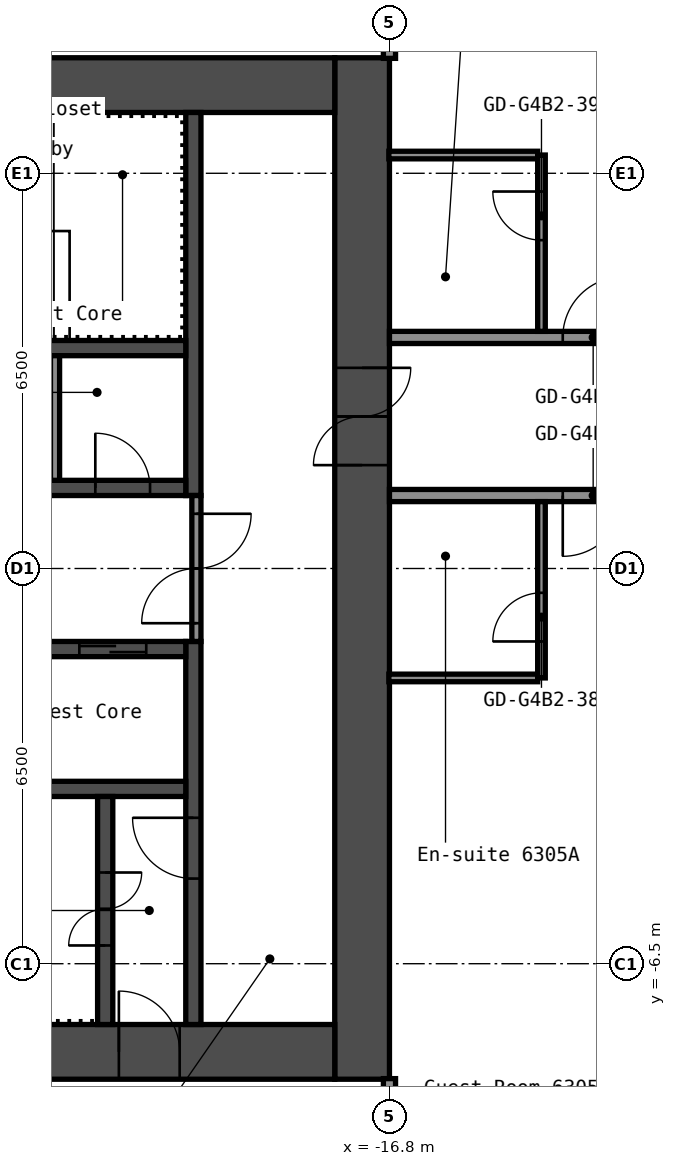
"""IFC4 building model, lengths in metres.
Left out: names, types, materials, properties, quantities, classifications, styles, units other than length and angle.
Written with IfcOpenShell. Run it as: python <this file> out.ifc"""

import sys

from ifc_helpers import new_model, si_unit, direction, frame, frame_2d, origin, place, context, subcontext, project, spatial, rectangle, extrude, element, fill, save


model = new_model("IFC4")
c1 = context("Model", 3, precision=1e-05, world=origin(), true_north=direction((0.0, 1.0)))
c2 = subcontext(c1, "Body", "Model", "MODEL_VIEW")
j1 = project(units=[si_unit("LENGTHUNIT", "METRE"), si_unit("PLANEANGLEUNIT", "RADIAN")], contexts=[c1])
p1 = place(None, origin())
s1 = spatial("IfcSite", under=j1, at=p1, CompositionType="ELEMENT")
p2 = place(p1, origin())
s2 = spatial("IfcBuilding", under=s1, at=p2, CompositionType="ELEMENT")
p3 = place(p2, frame((0.0, 0.0, 221.8)))
s3 = spatial("IfcBuildingStorey", under=s2, at=p3, CompositionType="ELEMENT", Elevation=221.8)
p4 = place(p3, frame((-17.25, -8.4, 0.0), z_axis=(0.0, 0.0, 1.0), x_axis=(0.0, 1.0, 0.0)))
e1 = element("IfcWall", 1, at=p4, inside=s3, PredefinedType="SHEAR", context=c2, shape_type="SweptSolid", body=[
    extrude(rectangle(XDim=16.8, YDim=0.9, at=frame_2d((8.4, 0.0))), origin(), (0.0, 0.0, 1.0), 2.75),
])
p5 = place(p4, frame((10.1, 0.0, 0.0)))
e2 = element("IfcOpeningElement", 2, at=p5, cuts=e1, PredefinedType="OPENING", context=c2, shape_type="SweptSolid", body=[
    extrude(rectangle(XDim=1.6, YDim=2.1, at=frame_2d((0.8, 1.05))), frame((0.0, 0.46, 0.0), z_axis=(0.0, -1.0, 0.0), x_axis=(1.0, 0.0, 0.0)), (0.0, 0.0, 1.0), 0.92),
])
p6 = place(p3, frame((-32.7, 7.95, 0.0), z_axis=(0.0, 0.0, 1.0), x_axis=(1.0, 0.0, 0.0)))
e3 = element("IfcWall", 3, at=p6, inside=s3, PredefinedType="SHEAR", context=c2, shape_type="SweptSolid", body=[
    extrude(rectangle(XDim=15.0, YDim=0.9, at=frame_2d((7.5, 0.0))), origin(), (0.0, 0.0, 1.0), 2.75),
])
p7 = place(p6, frame((3.4, 0.0, 0.0)))
e4 = element("IfcOpeningElement", 4, at=p7, cuts=e3, PredefinedType="OPENING", context=c2, shape_type="SweptSolid", body=[
    extrude(rectangle(XDim=1.2, YDim=2.1, at=frame_2d((0.6, 1.05))), frame((0.0, 0.46, 0.0), z_axis=(0.0, -1.0, 0.0), x_axis=(1.0, 0.0, 0.0)), (0.0, 0.0, 1.0), 0.92),
])
p8 = place(p6, frame((0.75, 0.0, 0.0)))
e5 = element("IfcOpeningElement", 5, at=p8, cuts=e3, PredefinedType="OPENING", context=c2, shape_type="SweptSolid", body=[
    extrude(rectangle(XDim=0.9, YDim=2.1, at=frame_2d((0.45, 1.05))), frame((0.0, 0.46, 0.0), z_axis=(0.0, -1.0, 0.0), x_axis=(1.0, 0.0, 0.0)), (0.0, 0.0, 1.0), 0.92),
])
p9 = place(p3, frame((-32.7, -7.95, 0.0), z_axis=(0.0, 0.0, 1.0), x_axis=(1.0, 0.0, 0.0)))
e6 = element("IfcWall", 6, at=p9, inside=s3, PredefinedType="SHEAR", context=c2, shape_type="SweptSolid", body=[
    extrude(rectangle(XDim=15.0, YDim=0.9, at=frame_2d((7.5, 0.0))), origin(), (0.0, 0.0, 1.0), 2.75),
])
p10 = place(p9, frame((11.45, 0.0, 0.0)))
e7 = element("IfcOpeningElement", 7, at=p10, cuts=e6, PredefinedType="OPENING", context=c2, shape_type="SweptSolid", body=[
    extrude(rectangle(XDim=1.0, YDim=2.1, at=frame_2d((0.5, 1.05))), frame((0.0, 0.46, 0.0), z_axis=(0.0, -1.0, 0.0), x_axis=(1.0, 0.0, 0.0)), (0.0, 0.0, 1.0), 0.92),
])
p11 = place(p3, frame((-20.025, 1.2, 0.0), z_axis=(0.0, 0.0, 1.0), x_axis=(0.0, 1.0, 0.0)))
e8 = element("IfcWall", 8, at=p11, inside=s3, PredefinedType="SHEAR", context=c2, shape_type="SweptSolid", body=[
    extrude(rectangle(XDim=6.3, YDim=0.25, at=frame_2d((3.15, 0.0))), origin(), (0.0, 0.0, 1.0), 2.75),
])
p12 = place(p3, frame((-20.025, -7.5, 0.0), z_axis=(0.0, 0.0, 1.0), x_axis=(0.0, 1.0, 0.0)))
e9 = element("IfcWall", 9, at=p12, inside=s3, PredefinedType="SHEAR", context=c2, shape_type="SweptSolid", body=[
    extrude(rectangle(XDim=6.3, YDim=0.25, at=frame_2d((3.15, 0.0))), origin(), (0.0, 0.0, 1.0), 2.75),
])
p13 = place(p12, frame((2.4, 0.0, 0.0)))
e10 = element("IfcOpeningElement", 10, at=p13, cuts=e9, PredefinedType="OPENING", context=c2, shape_type="SweptSolid", body=[
    extrude(rectangle(XDim=1.0, YDim=2.1, at=frame_2d((0.5, 1.05))), frame((0.0, 0.135, 0.0), z_axis=(0.0, -1.0, 0.0), x_axis=(1.0, 0.0, 0.0)), (0.0, 0.0, 1.0), 0.27),
])
p14 = place(p3, frame((-27.65, 1.325, 0.0), z_axis=(0.0, 0.0, 1.0), x_axis=(1.0, 0.0, 0.0)))
e11 = element("IfcWall", 11, at=p14, inside=s3, PredefinedType="SHEAR", context=c2, shape_type="SweptSolid", body=[
    extrude(rectangle(XDim=7.5, YDim=0.25, at=frame_2d((3.75, 0.0))), origin(), (0.0, 0.0, 1.0), 2.75),
])
p15 = place(p14, frame((6.012, 0.0, 0.0)))
e12 = element("IfcOpeningElement", 12, at=p15, cuts=e11, PredefinedType="OPENING", context=c2, shape_type="SweptSolid", body=[
    extrude(rectangle(XDim=0.9, YDim=2.1, at=frame_2d((0.45, 1.05))), frame((0.0, 0.135, 0.0), z_axis=(0.0, -1.0, 0.0), x_axis=(1.0, 0.0, 0.0)), (0.0, 0.0, 1.0), 0.27),
])
p16 = place(p14, frame((2.312, 0.0, 0.0)))
e13 = element("IfcOpeningElement", 13, at=p16, cuts=e11, PredefinedType="OPENING", context=c2, shape_type="SweptSolid", body=[
    extrude(rectangle(XDim=0.9, YDim=2.1, at=frame_2d((0.45, 1.05))), frame((0.0, 0.135, 0.0), z_axis=(0.0, -1.0, 0.0), x_axis=(1.0, 0.0, 0.0)), (0.0, 0.0, 1.0), 0.27),
])
p17 = place(p3, frame((-27.65, 3.625, 0.0), z_axis=(0.0, 0.0, 1.0), x_axis=(1.0, 0.0, 0.0)))
e14 = element("IfcWall", 14, at=p17, inside=s3, PredefinedType="SHEAR", context=c2, shape_type="SweptSolid", body=[
    extrude(rectangle(XDim=7.5, YDim=0.25, at=frame_2d((3.75, 0.0))), origin(), (0.0, 0.0, 1.0), 2.75),
])
p18 = place(p3, frame((-27.65, -1.325, 0.0), z_axis=(0.0, 0.0, 1.0), x_axis=(1.0, 0.0, 0.0)))
e15 = element("IfcWall", 15, at=p18, inside=s3, PredefinedType="SHEAR", context=c2, shape_type="SweptSolid", body=[
    extrude(rectangle(XDim=7.5, YDim=0.25, at=frame_2d((3.75, 0.0))), origin(), (0.0, 0.0, 1.0), 2.75),
])
p19 = place(p18, frame((5.75, 0.0, 0.0)))
e16 = element("IfcOpeningElement", 16, at=p19, cuts=e15, PredefinedType="OPENING", context=c2, shape_type="SweptSolid", body=[
    extrude(rectangle(XDim=1.1, YDim=2.1, at=frame_2d((0.55, 1.05))), frame((0.0, 0.135, 0.0), z_axis=(0.0, -1.0, 0.0), x_axis=(1.0, 0.0, 0.0)), (0.0, 0.0, 1.0), 0.27),
])
p20 = place(p18, frame((3.35, 0.0, 0.0)))
e17 = element("IfcOpeningElement", 17, at=p20, cuts=e15, PredefinedType="OPENING", context=c2, shape_type="SweptSolid", body=[
    extrude(rectangle(XDim=1.1, YDim=2.1, at=frame_2d((0.55, 1.05))), frame((0.0, 0.135, 0.0), z_axis=(0.0, -1.0, 0.0), x_axis=(1.0, 0.0, 0.0)), (0.0, 0.0, 1.0), 0.27),
])
p21 = place(p18, frame((0.95, 0.0, 0.0)))
e18 = element("IfcOpeningElement", 18, at=p21, cuts=e15, PredefinedType="OPENING", context=c2, shape_type="SweptSolid", body=[
    extrude(rectangle(XDim=1.1, YDim=2.1, at=frame_2d((0.55, 1.05))), frame((0.0, 0.135, 0.0), z_axis=(0.0, -1.0, 0.0), x_axis=(1.0, 0.0, 0.0)), (0.0, 0.0, 1.0), 0.27),
])
p22 = place(p3, frame((-27.65, -3.625, 0.0), z_axis=(0.0, 0.0, 1.0), x_axis=(1.0, 0.0, 0.0)))
e19 = element("IfcWall", 19, at=p22, inside=s3, PredefinedType="SHEAR", context=c2, shape_type="SweptSolid", body=[
    extrude(rectangle(XDim=7.5, YDim=0.25, at=frame_2d((3.75, 0.0))), origin(), (0.0, 0.0, 1.0), 2.75),
])
p23 = place(p3, frame((-21.475, -7.5, 0.0), z_axis=(0.0, 0.0, 1.0), x_axis=(0.0, 1.0, 0.0)))
e20 = element("IfcWall", 20, at=p23, inside=s3, PredefinedType="SHEAR", context=c2, shape_type="SweptSolid", body=[
    extrude(rectangle(XDim=3.75, YDim=0.25, at=frame_2d((1.875, 0.0))), origin(), (0.0, 0.0, 1.0), 2.75),
])
p24 = place(p23, frame((1.3, 0.0, 0.0)))
e21 = element("IfcOpeningElement", 21, at=p24, cuts=e20, PredefinedType="OPENING", context=c2, shape_type="SweptSolid", body=[
    extrude(rectangle(XDim=1.2, YDim=2.1, at=frame_2d((0.6, 1.05))), frame((0.0, 0.135, 0.0), z_axis=(0.0, -1.0, 0.0), x_axis=(1.0, 0.0, 0.0)), (0.0, 0.0, 1.0), 0.27),
])
p25 = place(p3, frame((-19.975, -1.2, 0.0), z_axis=(0.0, 0.0, 1.0), x_axis=(0.0, 1.0, 0.0)))
e22 = element("IfcWall", 22, at=p25, inside=s3, PredefinedType="PARTITIONING", context=c2, shape_type="SweptSolid", body=[
    extrude(rectangle(XDim=2.4, YDim=0.15, at=frame_2d((1.2, 0.0))), origin(), (0.0, 0.0, 1.0), 2.75),
])
p26 = place(p25, frame((0.3, 0.0, 0.0)))
e23 = element("IfcOpeningElement", 23, at=p26, cuts=e22, PredefinedType="OPENING", context=c2, shape_type="SweptSolid", body=[
    extrude(rectangle(XDim=1.8, YDim=2.1, at=frame_2d((0.9, 1.05))), frame((0.0, 0.085, 0.0), z_axis=(0.0, -1.0, 0.0), x_axis=(1.0, 0.0, 0.0)), (0.0, 0.0, 1.0), 0.17),
])
p27 = place(p3, frame((-22.3, 1.45, 0.0), z_axis=(0.0, 0.0, 1.0), x_axis=(0.0, 1.0, 0.0)))
e24 = element("IfcWall", 24, at=p27, inside=s3, PredefinedType="PARTITIONING", context=c2, shape_type="SweptSolid", body=[
    extrude(rectangle(XDim=2.05, YDim=0.15, at=frame_2d((1.025, 0.0))), origin(), (0.0, 0.0, 1.0), 2.75),
])
p28 = place(p3, frame((-16.81, -1.8, 0.0), z_axis=(0.0, 0.0, 1.0), x_axis=(1.0, 0.0, 0.0)))
e25 = element("IfcWall", 25, at=p28, inside=s3, PredefinedType="PARTITIONING", context=c2, shape_type="SweptSolid", body=[
    extrude(rectangle(XDim=2.448, YDim=0.125, at=frame_2d((1.224, 0.0))), origin(), (0.0, 0.0, 1.0), 2.75),
])
p29 = place(p3, frame((-16.8, 1.2, 0.0), z_axis=(0.0, 0.0, 1.0), x_axis=(1.0, 0.0, 0.0)))
e26 = element("IfcWall", 26, at=p29, inside=s3, PredefinedType="PARTITIONING", context=c2, shape_type="SweptSolid", body=[
    extrude(rectangle(XDim=33.6, YDim=0.2, at=frame_2d((16.8, 0.0))), origin(), (0.0, 0.0, 1.0), 2.75),
])
p30 = place(p29, frame((2.85, 0.0, 0.0)))
e27 = element("IfcOpeningElement", 27, at=p30, cuts=e26, PredefinedType="OPENING", context=c2, shape_type="SweptSolid", body=[
    extrude(rectangle(XDim=1.0, YDim=2.1, at=frame_2d((0.5, 1.05))), frame((0.0, 0.11, 0.0), z_axis=(0.0, -1.0, 0.0), x_axis=(1.0, 0.0, 0.0)), (0.0, 0.0, 1.0), 0.22),
])
p31 = place(p29, frame((4.55, 0.0, 0.0)))
e28 = element("IfcOpeningElement", 28, at=p31, cuts=e26, PredefinedType="OPENING", context=c2, shape_type="SweptSolid", body=[
    extrude(rectangle(XDim=1.0, YDim=2.1, at=frame_2d((0.5, 1.05))), frame((0.0, 0.11, 0.0), z_axis=(0.0, -1.0, 0.0), x_axis=(1.0, 0.0, 0.0)), (0.0, 0.0, 1.0), 0.22),
])
p32 = place(p29, frame((11.25, 0.0, 0.0)))
e29 = element("IfcOpeningElement", 29, at=p32, cuts=e26, PredefinedType="OPENING", context=c2, shape_type="SweptSolid", body=[
    extrude(rectangle(XDim=1.0, YDim=2.1, at=frame_2d((0.5, 1.05))), frame((0.0, 0.11, 0.0), z_axis=(0.0, -1.0, 0.0), x_axis=(1.0, 0.0, 0.0)), (0.0, 0.0, 1.0), 0.22),
])
p33 = place(p29, frame((12.95, 0.0, 0.0)))
e30 = element("IfcOpeningElement", 30, at=p33, cuts=e26, PredefinedType="OPENING", context=c2, shape_type="SweptSolid", body=[
    extrude(rectangle(XDim=1.0, YDim=2.1, at=frame_2d((0.5, 1.05))), frame((0.0, 0.11, 0.0), z_axis=(0.0, -1.0, 0.0), x_axis=(1.0, 0.0, 0.0)), (0.0, 0.0, 1.0), 0.22),
])
p34 = place(p29, frame((20.5, 0.0, 0.0)))
e31 = element("IfcOpeningElement", 31, at=p34, cuts=e26, PredefinedType="OPENING", context=c2, shape_type="SweptSolid", body=[
    extrude(rectangle(XDim=1.0, YDim=2.1, at=frame_2d((0.5, 1.05))), frame((0.0, 0.11, 0.0), z_axis=(0.0, -1.0, 0.0), x_axis=(1.0, 0.0, 0.0)), (0.0, 0.0, 1.0), 0.22),
])
p35 = place(p29, frame((28.05, 0.0, 0.0)))
e32 = element("IfcOpeningElement", 32, at=p35, cuts=e26, PredefinedType="OPENING", context=c2, shape_type="SweptSolid", body=[
    extrude(rectangle(XDim=1.0, YDim=2.1, at=frame_2d((0.5, 1.05))), frame((0.0, 0.11, 0.0), z_axis=(0.0, -1.0, 0.0), x_axis=(1.0, 0.0, 0.0)), (0.0, 0.0, 1.0), 0.22),
])
p36 = place(p29, frame((29.75, 0.0, 0.0)))
e33 = element("IfcOpeningElement", 33, at=p36, cuts=e26, PredefinedType="OPENING", context=c2, shape_type="SweptSolid", body=[
    extrude(rectangle(XDim=1.0, YDim=2.1, at=frame_2d((0.5, 1.05))), frame((0.0, 0.11, 0.0), z_axis=(0.0, -1.0, 0.0), x_axis=(1.0, 0.0, 0.0)), (0.0, 0.0, 1.0), 0.22),
])
p37 = place(p3, frame((-16.8, 3.8, 0.0), z_axis=(0.0, 0.0, 1.0), x_axis=(1.0, 0.0, 0.0)))
e34 = element("IfcWall", 34, at=p37, inside=s3, PredefinedType="PARTITIONING", context=c2, shape_type="SweptSolid", body=[
    extrude(rectangle(XDim=33.6, YDim=0.2, at=frame_2d((16.8, 0.0))), origin(), (0.0, 0.0, 1.0), 2.75),
])
p38 = place(p37, frame((2.85, 0.0, 0.0)))
e35 = element("IfcOpeningElement", 35, at=p38, cuts=e34, PredefinedType="OPENING", context=c2, shape_type="SweptSolid", body=[
    extrude(rectangle(XDim=1.0, YDim=2.1, at=frame_2d((0.5, 1.05))), frame((0.0, 0.11, 0.0), z_axis=(0.0, -1.0, 0.0), x_axis=(1.0, 0.0, 0.0)), (0.0, 0.0, 1.0), 0.22),
])
p39 = place(p37, frame((4.55, 0.0, 0.0)))
e36 = element("IfcOpeningElement", 36, at=p39, cuts=e34, PredefinedType="OPENING", context=c2, shape_type="SweptSolid", body=[
    extrude(rectangle(XDim=1.0, YDim=2.1, at=frame_2d((0.5, 1.05))), frame((0.0, 0.11, 0.0), z_axis=(0.0, -1.0, 0.0), x_axis=(1.0, 0.0, 0.0)), (0.0, 0.0, 1.0), 0.22),
])
p40 = place(p37, frame((9.46, 0.0, 0.0)))
e37 = element("IfcOpeningElement", 37, at=p40, cuts=e34, PredefinedType="OPENING", context=c2, shape_type="SweptSolid", body=[
    extrude(rectangle(XDim=0.9, YDim=2.1, at=frame_2d((0.45, 1.05))), frame((0.0, 0.11, 0.0), z_axis=(0.0, -1.0, 0.0), x_axis=(1.0, 0.0, 0.0)), (0.0, 0.0, 1.0), 0.22),
])
p41 = place(p37, frame((13.66, 0.0, 0.0)))
e38 = element("IfcOpeningElement", 38, at=p41, cuts=e34, PredefinedType="OPENING", context=c2, shape_type="SweptSolid", body=[
    extrude(rectangle(XDim=0.9, YDim=2.1, at=frame_2d((0.45, 1.05))), frame((0.0, 0.11, 0.0), z_axis=(0.0, -1.0, 0.0), x_axis=(1.0, 0.0, 0.0)), (0.0, 0.0, 1.0), 0.22),
])
p42 = place(p37, frame((19.65, 0.0, 0.0)))
e39 = element("IfcOpeningElement", 39, at=p42, cuts=e34, PredefinedType="OPENING", context=c2, shape_type="SweptSolid", body=[
    extrude(rectangle(XDim=1.0, YDim=2.1, at=frame_2d((0.5, 1.05))), frame((0.0, 0.11, 0.0), z_axis=(0.0, -1.0, 0.0), x_axis=(1.0, 0.0, 0.0)), (0.0, 0.0, 1.0), 0.22),
])
p43 = place(p37, frame((21.35, 0.0, 0.0)))
e40 = element("IfcOpeningElement", 40, at=p43, cuts=e34, PredefinedType="OPENING", context=c2, shape_type="SweptSolid", body=[
    extrude(rectangle(XDim=1.0, YDim=2.1, at=frame_2d((0.5, 1.05))), frame((0.0, 0.11, 0.0), z_axis=(0.0, -1.0, 0.0), x_axis=(1.0, 0.0, 0.0)), (0.0, 0.0, 1.0), 0.22),
])
p44 = place(p37, frame((28.05, 0.0, 0.0)))
e41 = element("IfcOpeningElement", 41, at=p44, cuts=e34, PredefinedType="OPENING", context=c2, shape_type="SweptSolid", body=[
    extrude(rectangle(XDim=1.0, YDim=2.1, at=frame_2d((0.5, 1.05))), frame((0.0, 0.11, 0.0), z_axis=(0.0, -1.0, 0.0), x_axis=(1.0, 0.0, 0.0)), (0.0, 0.0, 1.0), 0.22),
])
p45 = place(p37, frame((29.75, 0.0, 0.0)))
e42 = element("IfcOpeningElement", 42, at=p45, cuts=e34, PredefinedType="OPENING", context=c2, shape_type="SweptSolid", body=[
    extrude(rectangle(XDim=1.0, YDim=2.1, at=frame_2d((0.5, 1.05))), frame((0.0, 0.11, 0.0), z_axis=(0.0, -1.0, 0.0), x_axis=(1.0, 0.0, 0.0)), (0.0, 0.0, 1.0), 0.22),
])
p46 = place(p3, frame((-16.81, 6.8, 0.0), z_axis=(0.0, 0.0, 1.0), x_axis=(1.0, 0.0, 0.0)))
e43 = element("IfcWall", 43, at=p46, inside=s3, PredefinedType="PARTITIONING", context=c2, shape_type="SweptSolid", body=[
    extrude(rectangle(XDim=2.448, YDim=0.125, at=frame_2d((1.224, 0.0))), origin(), (0.0, 0.0, 1.0), 2.75),
])
p47 = place(p3, frame((-16.8, -15.55, 0.0), z_axis=(0.0, 0.0, 1.0), x_axis=(0.0, 1.0, 0.0)))
e44 = element("IfcWall", 44, at=p47, inside=s3, PredefinedType="PARTITIONING", context=c2, shape_type="SweptSolid", body=[
    extrude(rectangle(XDim=7.16, YDim=0.2, at=frame_2d((3.58, 0.0))), origin(), (0.0, 0.0, 1.0), 2.75),
])
p48 = place(p3, frame((-16.8, 8.39, 0.0), z_axis=(0.0, 0.0, 1.0), x_axis=(0.0, 1.0, 0.0)))
e45 = element("IfcWall", 45, at=p48, inside=s3, PredefinedType="PARTITIONING", context=c2, shape_type="SweptSolid", body=[
    extrude(rectangle(XDim=12.16, YDim=0.2, at=frame_2d((6.08, 0.0))), origin(), (0.0, 0.0, 1.0), 2.75),
])
p49 = place(p3, frame((-14.3, -1.8, 0.0), z_axis=(0.0, 0.0, 1.0), x_axis=(0.0, 1.0, 0.0)))
e46 = element("IfcWall", 46, at=p49, inside=s3, PredefinedType="PARTITIONING", context=c2, shape_type="SweptSolid", body=[
    extrude(rectangle(XDim=2.9, YDim=0.125, at=frame_2d((1.45, 0.0))), origin(), (0.0, 0.0, 1.0), 2.75),
])
p50 = place(p49, frame((0.6, 0.0, 0.0)))
e47 = element("IfcOpeningElement", 47, at=p50, cuts=e46, PredefinedType="OPENING", context=c2, shape_type="SweptSolid", body=[
    extrude(rectangle(XDim=0.8, YDim=2.1, at=frame_2d((0.4, 1.05))), frame((0.0, 0.073, 0.0), z_axis=(0.0, -1.0, 0.0), x_axis=(1.0, 0.0, 0.0)), (0.0, 0.0, 1.0), 0.145),
])
p51 = place(p3, frame((-14.3, 3.9, 0.0), z_axis=(0.0, 0.0, 1.0), x_axis=(0.0, 1.0, 0.0)))
e48 = element("IfcWall", 48, at=p51, inside=s3, PredefinedType="PARTITIONING", context=c2, shape_type="SweptSolid", body=[
    extrude(rectangle(XDim=2.9, YDim=0.125, at=frame_2d((1.45, 0.0))), origin(), (0.0, 0.0, 1.0), 2.75),
])
p52 = place(p51, frame((1.5, 0.0, 0.0)))
e49 = element("IfcOpeningElement", 49, at=p52, cuts=e48, PredefinedType="OPENING", context=c2, shape_type="SweptSolid", body=[
    extrude(rectangle(XDim=0.8, YDim=2.1, at=frame_2d((0.4, 1.05))), frame((0.0, 0.073, 0.0), z_axis=(0.0, -1.0, 0.0), x_axis=(1.0, 0.0, 0.0)), (0.0, 0.0, 1.0), 0.145),
])
p53 = place(p5, origin())
e50 = element("IfcDoor", 50, at=p53, inside=s3, OperationType="DOUBLE_DOOR_SINGLE_SWING", PredefinedType="DOOR", context=c2, shape_type="SweptSolid", body=[
    extrude(rectangle(XDim=1.6, YDim=2.1, at=frame_2d((0.8, 1.05))), frame((0.0, 0.025, 0.0), z_axis=(0.0, -1.0, 0.0), x_axis=(1.0, 0.0, 0.0)), (0.0, 0.0, 1.0), 0.05),
])
fill(e2, e50)
p54 = place(p10, origin())
e51 = element("IfcDoor", 51, at=p54, inside=s3, OperationType="SINGLE_SWING_RIGHT", PredefinedType="DOOR", context=c2, shape_type="SweptSolid", body=[
    extrude(rectangle(XDim=1.0, YDim=2.1, at=frame_2d((0.5, 1.05))), frame((0.0, 0.025, 0.0), z_axis=(0.0, -1.0, 0.0), x_axis=(1.0, 0.0, 0.0)), (0.0, 0.0, 1.0), 0.05),
])
fill(e7, e51)
p55 = place(p24, origin())
e52 = element("IfcDoor", 52, at=p55, inside=s3, OperationType="DOUBLE_DOOR_SINGLE_SWING", PredefinedType="DOOR", context=c2, shape_type="SweptSolid", body=[
    extrude(rectangle(XDim=1.2, YDim=2.1, at=frame_2d((0.6, 1.05))), frame((0.0, 0.025, 0.0), z_axis=(0.0, -1.0, 0.0), x_axis=(1.0, 0.0, 0.0)), (0.0, 0.0, 1.0), 0.05),
])
fill(e21, e52)
p56 = place(p13, origin())
e53 = element("IfcDoor", 53, at=p56, inside=s3, OperationType="SINGLE_SWING_LEFT", PredefinedType="DOOR", context=c2, shape_type="SweptSolid", body=[
    extrude(rectangle(XDim=1.0, YDim=2.1, at=frame_2d((0.5, 1.05))), frame((0.0, 0.025, 0.0), z_axis=(0.0, -1.0, 0.0), x_axis=(1.0, 0.0, 0.0)), (0.0, 0.0, 1.0), 0.05),
])
fill(e10, e53)
p57 = place(p26, origin())
e54 = element("IfcDoor", 54, at=p57, inside=s3, OperationType="DOUBLE_DOOR_SINGLE_SWING", PredefinedType="DOOR", context=c2, shape_type="SweptSolid", body=[
    extrude(rectangle(XDim=1.8, YDim=2.1, at=frame_2d((0.9, 1.05))), frame((0.0, 0.025, 0.0), z_axis=(0.0, -1.0, 0.0), x_axis=(1.0, 0.0, 0.0)), (0.0, 0.0, 1.0), 0.05),
])
fill(e23, e54)
p58 = place(p15, origin())
e55 = element("IfcDoor", 55, at=p58, inside=s3, OperationType="SINGLE_SWING_RIGHT", PredefinedType="DOOR", context=c2, shape_type="SweptSolid", body=[
    extrude(rectangle(XDim=0.9, YDim=2.1, at=frame_2d((0.45, 1.05))), frame((0.0, 0.025, 0.0), z_axis=(0.0, -1.0, 0.0), x_axis=(1.0, 0.0, 0.0)), (0.0, 0.0, 1.0), 0.05),
])
fill(e12, e55)
p59 = place(p19, origin())
e56 = element("IfcDoor", 56, at=p59, inside=s3, OperationType="DOUBLE_DOOR_SLIDING", PredefinedType="DOOR", context=c2, shape_type="SweptSolid", body=[
    extrude(rectangle(XDim=1.1, YDim=2.1, at=frame_2d((0.55, 1.05))), frame((0.0, 0.025, 0.0), z_axis=(0.0, -1.0, 0.0), x_axis=(1.0, 0.0, 0.0)), (0.0, 0.0, 1.0), 0.05),
])
fill(e16, e56)
p60 = place(p30, origin())
e57 = element("IfcDoor", 57, at=p60, inside=s3, OperationType="SINGLE_SWING_LEFT", PredefinedType="DOOR", context=c2, shape_type="SweptSolid", body=[
    extrude(rectangle(XDim=1.0, YDim=2.1, at=frame_2d((0.5, 1.05))), frame((0.0, 0.025, 0.0), z_axis=(0.0, -1.0, 0.0), x_axis=(1.0, 0.0, 0.0)), (0.0, 0.0, 1.0), 0.05),
])
fill(e27, e57)
p61 = place(p38, origin())
e58 = element("IfcDoor", 58, at=p61, inside=s3, OperationType="SINGLE_SWING_LEFT", PredefinedType="DOOR", context=c2, shape_type="SweptSolid", body=[
    extrude(rectangle(XDim=1.0, YDim=2.1, at=frame_2d((0.5, 1.05))), frame((0.0, 0.025, 0.0), z_axis=(0.0, -1.0, 0.0), x_axis=(1.0, 0.0, 0.0)), (0.0, 0.0, 1.0), 0.05),
])
fill(e35, e58)
p62 = place(p50, origin())
e59 = element("IfcDoor", 59, at=p62, inside=s3, OperationType="SINGLE_SWING_RIGHT", PredefinedType="DOOR", context=c2, shape_type="SweptSolid", body=[
    extrude(rectangle(XDim=0.8, YDim=2.1, at=frame_2d((0.4, 1.05))), frame((0.0, 0.025, 0.0), z_axis=(0.0, -1.0, 0.0), x_axis=(1.0, 0.0, 0.0)), (0.0, 0.0, 1.0), 0.05),
])
fill(e47, e59)
p63 = place(p52, origin())
e60 = element("IfcDoor", 60, at=p63, inside=s3, OperationType="SINGLE_SWING_LEFT", PredefinedType="DOOR", context=c2, shape_type="SweptSolid", body=[
    extrude(rectangle(XDim=0.8, YDim=2.1, at=frame_2d((0.4, 1.05))), frame((0.0, 0.025, 0.0), z_axis=(0.0, -1.0, 0.0), x_axis=(1.0, 0.0, 0.0)), (0.0, 0.0, 1.0), 0.05),
])
fill(e49, e60)
save(model, sys.argv[1])
